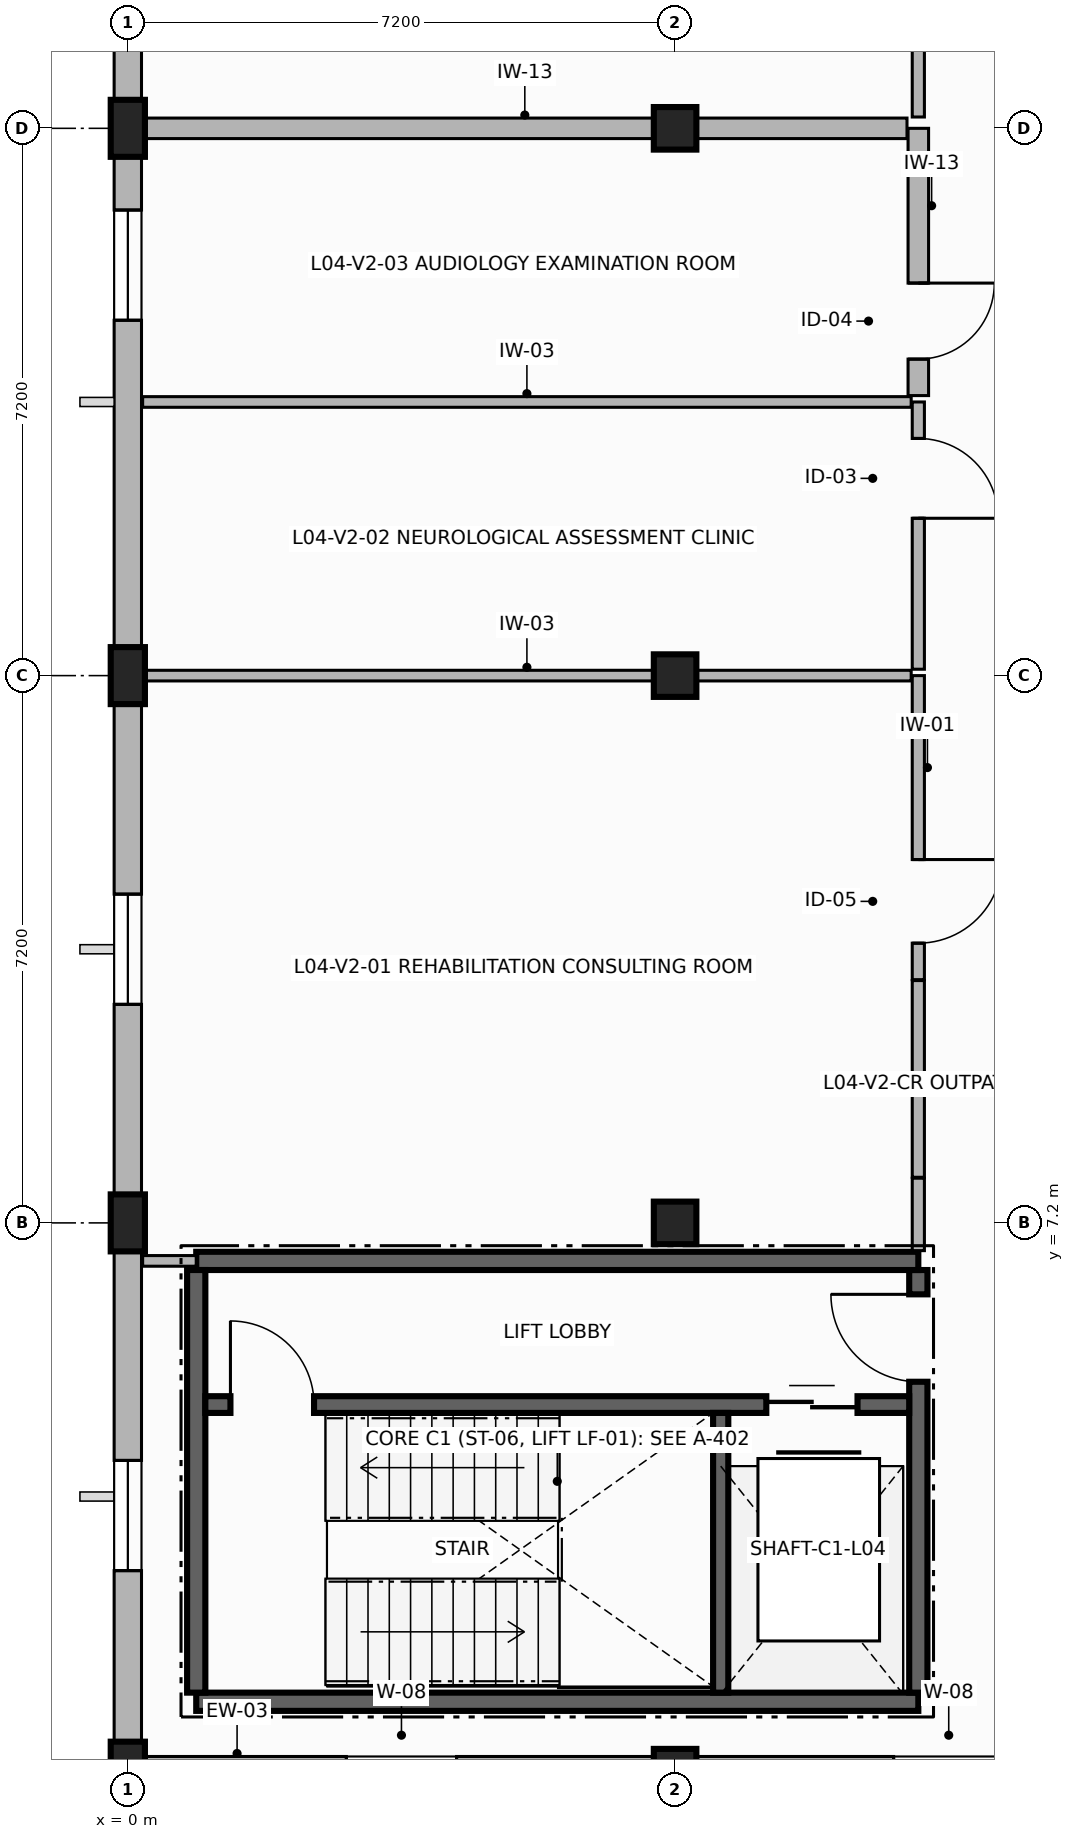
"""IFC4 building model, lengths in metres.
Left out: names, types, materials, properties, quantities, classifications, styles, units other than length and angle.
Written with IfcOpenShell. Run it as: python <this file> out.ifc"""

import sys

from ifc_helpers import new_model, si_unit, direction, frame, frame_2d, origin, origin_with_axes, origin_2d, place, context, subcontext, project, spatial, rectangle, extrude, element, fill, save


model = new_model("IFC4")
c1 = context("Model", 3, precision=1e-05, world=origin(), true_north=direction((0.0, 1.0)))
c2 = subcontext(c1, "Body", "Model", "MODEL_VIEW")
j1 = project(units=[si_unit("LENGTHUNIT", "METRE"), si_unit("PLANEANGLEUNIT", "RADIAN")], contexts=[c1])
p1 = place(None, origin())
s1 = spatial("IfcSite", under=j1, at=p1, CompositionType="ELEMENT")
p2 = place(p1, origin())
s2 = spatial("IfcBuilding", under=s1, at=p2, CompositionType="ELEMENT")
p3 = place(p2, frame((0.0, 0.0, 16.0)))
s3 = spatial("IfcBuildingStorey", under=s2, at=p3, CompositionType="ELEMENT", Elevation=16.0)
for number, where, z_axis, x_axis in (
    (1, (0.0, 0.0, 0.0), (0.0, 0.0, 1.0), (1.0, 0.0, 0.0)),
    (2, (0.0, 7.2, 0.0), (0.0, 0.0, 1.0), (1.0, 0.0, 0.0)),
    (3, (0.0, 14.4, 0.0), (0.0, 0.0, 1.0), (1.0, 0.0, 0.0)),
    (4, (0.0, 21.6, 0.0), (0.0, 0.0, 1.0), (1.0, 0.0, 0.0)),
):
    element("IfcColumn", number, at=place(p3, frame(where, z_axis=z_axis, x_axis=x_axis)), inside=s3, PredefinedType="PILASTER", context=c2, shape_type="SweptSolid", body=[
        extrude(rectangle(XDim=0.45, YDim=0.75, at=origin_2d()), origin(), (0.0, 0.0, 1.0), 3.42),
    ])
for number, where, z_axis, x_axis in (
    (5, (7.2, 0.0, 0.0), (0.0, 0.0, 1.0), (1.0, 0.0, 0.0)),
    (6, (7.2, 7.2, 0.0), (0.0, 0.0, 1.0), (1.0, 0.0, 0.0)),
    (7, (7.2, 14.4, 0.0), (0.0, 0.0, 1.0), (1.0, 0.0, 0.0)),
    (8, (7.2, 21.6, 0.0), (0.0, 0.0, 1.0), (1.0, 0.0, 0.0)),
):
    element("IfcColumn", number, at=place(p3, frame(where, z_axis=z_axis, x_axis=x_axis)), inside=s3, PredefinedType="COLUMN", context=c2, shape_type="SweptSolid", body=[
        extrude(rectangle(XDim=0.56, YDim=0.56, at=origin_2d()), origin(), (0.0, 0.0, 1.0), 3.42),
    ])
p4 = place(p3, origin_with_axes())
e9 = element("IfcWall", 9, at=p4, inside=s3, PredefinedType="SOLIDWALL", context=c2, shape_type="SweptSolid", body=[
    extrude(rectangle(XDim=7.2, YDim=0.36, at=frame_2d((3.6, 0.0))), origin(), (0.0, 0.0, 1.0), 2.8),
])
p5 = place(p4, frame((2.875, 0.0, 0.85)))
e10 = element("IfcOpeningElement", 10, at=p5, cuts=e9, PredefinedType="OPENING", context=c2, shape_type="SweptSolid", body=[
    extrude(rectangle(XDim=1.45, YDim=1.75, at=frame_2d((0.725, 0.875))), frame((0.0, 0.19, 0.0), z_axis=(0.0, -1.0, 0.0), x_axis=(1.0, 0.0, 0.0)), (0.0, 0.0, 1.0), 0.38),
])
p6 = place(p3, frame((7.2, 0.0, 0.0), z_axis=(0.0, 0.0, 1.0), x_axis=(1.0, 0.0, 0.0)))
e11 = element("IfcWall", 11, at=p6, inside=s3, PredefinedType="SOLIDWALL", context=c2, shape_type="SweptSolid", body=[
    extrude(rectangle(XDim=7.2, YDim=0.36, at=frame_2d((3.6, 0.0))), origin(), (0.0, 0.0, 1.0), 2.8),
])
p7 = place(p6, frame((2.875, 0.0, 0.85)))
e12 = element("IfcOpeningElement", 12, at=p7, cuts=e11, PredefinedType="OPENING", context=c2, shape_type="SweptSolid", body=[
    extrude(rectangle(XDim=1.45, YDim=1.75, at=frame_2d((0.725, 0.875))), frame((0.0, 0.19, 0.0), z_axis=(0.0, -1.0, 0.0), x_axis=(1.0, 0.0, 0.0)), (0.0, 0.0, 1.0), 0.38),
])
p8 = place(p3, frame((0.0, 28.8, 0.0), z_axis=(0.0, 0.0, 1.0), x_axis=(0.0, -1.0, 0.0)))
e13 = element("IfcWall", 13, at=p8, inside=s3, PredefinedType="SOLIDWALL", context=c2, shape_type="SweptSolid", body=[
    extrude(rectangle(XDim=7.2, YDim=0.36, at=frame_2d((3.6, 0.0))), origin(), (0.0, 0.0, 1.0), 2.8),
])
p9 = place(p8, frame((2.875, 0.0, 0.85)))
e14 = element("IfcOpeningElement", 14, at=p9, cuts=e13, PredefinedType="OPENING", context=c2, shape_type="SweptSolid", body=[
    extrude(rectangle(XDim=1.45, YDim=1.75, at=frame_2d((0.725, 0.875))), frame((0.0, 0.19, 0.0), z_axis=(0.0, -1.0, 0.0), x_axis=(1.0, 0.0, 0.0)), (0.0, 0.0, 1.0), 0.38),
])
p10 = place(p3, frame((0.0, 21.6, 0.0), z_axis=(0.0, 0.0, 1.0), x_axis=(0.0, -1.0, 0.0)))
e15 = element("IfcWall", 15, at=p10, inside=s3, PredefinedType="SOLIDWALL", context=c2, shape_type="SweptSolid", body=[
    extrude(rectangle(XDim=7.2, YDim=0.36, at=frame_2d((3.6, 0.0))), origin(), (0.0, 0.0, 1.0), 2.8),
])
p11 = place(p10, frame((1.075, 0.0, 0.85)))
e16 = element("IfcOpeningElement", 16, at=p11, cuts=e15, PredefinedType="OPENING", context=c2, shape_type="SweptSolid", body=[
    extrude(rectangle(XDim=1.45, YDim=1.75, at=frame_2d((0.725, 0.875))), frame((0.0, 0.19, 0.0), z_axis=(0.0, -1.0, 0.0), x_axis=(1.0, 0.0, 0.0)), (0.0, 0.0, 1.0), 0.38),
])
p12 = place(p3, frame((0.0, 14.4, 0.0), z_axis=(0.0, 0.0, 1.0), x_axis=(0.0, -1.0, 0.0)))
e17 = element("IfcWall", 17, at=p12, inside=s3, PredefinedType="SOLIDWALL", context=c2, shape_type="SweptSolid", body=[
    extrude(rectangle(XDim=7.2, YDim=0.36, at=frame_2d((3.6, 0.0))), origin(), (0.0, 0.0, 1.0), 2.8),
])
p13 = place(p12, frame((2.875, 0.0, 0.85)))
e18 = element("IfcOpeningElement", 18, at=p13, cuts=e17, PredefinedType="OPENING", context=c2, shape_type="SweptSolid", body=[
    extrude(rectangle(XDim=1.45, YDim=1.75, at=frame_2d((0.725, 0.875))), frame((0.0, 0.19, 0.0), z_axis=(0.0, -1.0, 0.0), x_axis=(1.0, 0.0, 0.0)), (0.0, 0.0, 1.0), 0.38),
])
p14 = place(p3, frame((0.0, 7.2, 0.0), z_axis=(0.0, 0.0, 1.0), x_axis=(0.0, -1.0, 0.0)))
e19 = element("IfcWall", 19, at=p14, inside=s3, PredefinedType="SOLIDWALL", context=c2, shape_type="SweptSolid", body=[
    extrude(rectangle(XDim=7.2, YDim=0.36, at=frame_2d((3.6, 0.0))), origin(), (0.0, 0.0, 1.0), 2.8),
])
p15 = place(p14, frame((3.125, 0.0, 0.85)))
e20 = element("IfcOpeningElement", 20, at=p15, cuts=e19, PredefinedType="OPENING", context=c2, shape_type="SweptSolid", body=[
    extrude(rectangle(XDim=1.45, YDim=1.75, at=frame_2d((0.725, 0.875))), frame((0.0, 0.19, 0.0), z_axis=(0.0, -1.0, 0.0), x_axis=(1.0, 0.0, 0.0)), (0.0, 0.0, 1.0), 0.38),
])
p16 = place(p3, frame((0.9, 0.9, 0.0), z_axis=(0.0, 0.0, 1.0), x_axis=(1.0, 0.0, 0.0)))
e21 = element("IfcWall", 21, at=p16, inside=s3, PredefinedType="SHEAR", context=c2, shape_type="SweptSolid", body=[
    extrude(rectangle(XDim=9.5, YDim=0.24, at=frame_2d((4.75, 0.0))), origin(), (0.0, 0.0, 1.0), 3.42),
])
p17 = place(p3, frame((10.4, 1.02, 0.0), z_axis=(0.0, 0.0, 1.0), x_axis=(0.0, 1.0, 0.0)))
e22 = element("IfcWall", 22, at=p17, inside=s3, PredefinedType="SHEAR", context=c2, shape_type="SweptSolid", body=[
    extrude(rectangle(XDim=5.56, YDim=0.24, at=frame_2d((2.78, 0.0))), origin(), (0.0, 0.0, 1.0), 3.42),
])
p18 = place(p17, frame((4.09, 0.0, 0.0)))
e23 = element("IfcOpeningElement", 23, at=p18, cuts=e22, PredefinedType="OPENING", context=c2, shape_type="SweptSolid", body=[
    extrude(rectangle(XDim=1.15, YDim=2.2, at=frame_2d((0.575, 1.1))), frame((0.0, 0.13, 0.0), z_axis=(0.0, -1.0, 0.0), x_axis=(1.0, 0.0, 0.0)), (0.0, 0.0, 1.0), 0.26),
])
p19 = place(p3, frame((10.4, 6.7, 0.0), z_axis=(0.0, 0.0, 1.0), x_axis=(-1.0, 0.0, 0.0)))
e24 = element("IfcWall", 24, at=p19, inside=s3, PredefinedType="SHEAR", context=c2, shape_type="SweptSolid", body=[
    extrude(rectangle(XDim=9.5, YDim=0.24, at=frame_2d((4.75, 0.0))), origin(), (0.0, 0.0, 1.0), 3.42),
])
p20 = place(p3, frame((0.9, 6.58, 0.0), z_axis=(0.0, 0.0, 1.0), x_axis=(0.0, -1.0, 0.0)))
e25 = element("IfcWall", 25, at=p20, inside=s3, PredefinedType="SHEAR", context=c2, shape_type="SweptSolid", body=[
    extrude(rectangle(XDim=5.56, YDim=0.24, at=frame_2d((2.78, 0.0))), origin(), (0.0, 0.0, 1.0), 3.42),
])
p21 = place(p3, frame((1.02, 4.81, 0.0), z_axis=(0.0, 0.0, 1.0), x_axis=(1.0, 0.0, 0.0)))
e26 = element("IfcWall", 26, at=p21, inside=s3, PredefinedType="SHEAR", context=c2, shape_type="SweptSolid", body=[
    extrude(rectangle(XDim=9.26, YDim=0.22, at=frame_2d((4.63, 0.0))), origin(), (0.0, 0.0, 1.0), 3.42),
])
p22 = place(p21, frame((0.33, 0.0, 0.0)))
e27 = element("IfcOpeningElement", 27, at=p22, cuts=e26, PredefinedType="OPENING", context=c2, shape_type="SweptSolid", body=[
    extrude(rectangle(XDim=1.1, YDim=2.15, at=frame_2d((0.55, 1.075))), frame((0.0, 0.12, 0.0), z_axis=(0.0, -1.0, 0.0), x_axis=(1.0, 0.0, 0.0)), (0.0, 0.0, 1.0), 0.24),
])
p23 = place(p21, frame((7.38, 0.0, 0.0)))
e28 = element("IfcOpeningElement", 28, at=p23, cuts=e26, PredefinedType="OPENING", context=c2, shape_type="SweptSolid", body=[
    extrude(rectangle(XDim=1.2, YDim=2.2, at=frame_2d((0.6, 1.1))), frame((0.0, 0.12, 0.0), z_axis=(0.0, -1.0, 0.0), x_axis=(1.0, 0.0, 0.0)), (0.0, 0.0, 1.0), 0.24),
])
p24 = place(p3, frame((7.8, 1.02, 0.0), z_axis=(0.0, 0.0, 1.0), x_axis=(0.0, 1.0, 0.0)))
e29 = element("IfcWall", 29, at=p24, inside=s3, PredefinedType="SHEAR", context=c2, shape_type="SweptSolid", body=[
    extrude(rectangle(XDim=3.68, YDim=0.2, at=frame_2d((1.84, 0.0))), origin(), (0.0, 0.0, 1.0), 3.42),
])
p25 = place(p3, frame((10.4, 14.4, 0.0), z_axis=(0.0, 0.0, 1.0), x_axis=(0.0, -1.0, 0.0)))
e30 = element("IfcWall", 30, at=p25, inside=s3, PredefinedType="PARTITIONING", context=c2, shape_type="SweptSolid", body=[
    extrude(rectangle(XDim=4.0, YDim=0.16, at=frame_2d((2.0, 0.0))), origin(), (0.0, 0.0, 1.0), 2.78),
])
p26 = place(p25, frame((2.42, 0.0, 0.0)))
e31 = element("IfcOpeningElement", 31, at=p26, cuts=e30, PredefinedType="OPENING", context=c2, shape_type="SweptSolid", body=[
    extrude(rectangle(XDim=1.1, YDim=2.2, at=frame_2d((0.55, 1.1))), frame((0.0, 0.09, 0.0), z_axis=(0.0, -1.0, 0.0), x_axis=(1.0, 0.0, 0.0)), (0.0, 0.0, 1.0), 0.18),
])
p27 = place(p3, frame((10.4, 10.388, 0.0), z_axis=(0.0, 0.0, 1.0), x_axis=(0.0, -1.0, 0.0)))
e32 = element("IfcWall", 32, at=p27, inside=s3, PredefinedType="PARTITIONING", context=c2, shape_type="SweptSolid", body=[
    extrude(rectangle(XDim=2.588, YDim=0.16, at=frame_2d((1.294, 0.0))), origin(), (0.0, 0.0, 1.0), 2.78),
])
p28 = place(p3, frame((10.4, 7.788, 0.0), z_axis=(0.0, 0.0, 1.0), x_axis=(0.0, -1.0, 0.0)))
e33 = element("IfcWall", 33, at=p28, inside=s3, PredefinedType="PARTITIONING", context=c2, shape_type="SweptSolid", body=[
    extrude(rectangle(XDim=0.953, YDim=0.16, at=frame_2d((0.477, 0.0))), origin(), (0.0, 0.0, 1.0), 2.78),
])
p29 = place(p3, frame((0.9, 6.7, 0.0), z_axis=(0.0, 0.0, 1.0), x_axis=(-1.0, 0.0, 0.0)))
e34 = element("IfcWall", 34, at=p29, inside=s3, PredefinedType="PARTITIONING", context=c2, shape_type="SweptSolid", body=[
    extrude(rectangle(XDim=0.705, YDim=0.14, at=frame_2d((0.353, 0.0))), origin(), (0.0, 0.0, 1.0), 2.78),
])
p30 = place(p3, frame((0.195, 14.4, 0.0), z_axis=(0.0, 0.0, 1.0), x_axis=(1.0, 0.0, 0.0)))
e35 = element("IfcWall", 35, at=p30, inside=s3, PredefinedType="PARTITIONING", context=c2, shape_type="SweptSolid", body=[
    extrude(rectangle(XDim=10.111, YDim=0.14, at=frame_2d((5.055, 0.0))), origin(), (0.0, 0.0, 1.0), 2.78),
])
p31 = place(p3, frame((10.4, 18.0, 0.0), z_axis=(0.0, 0.0, 1.0), x_axis=(0.0, -1.0, 0.0)))
e36 = element("IfcWall", 36, at=p31, inside=s3, PredefinedType="PARTITIONING", context=c2, shape_type="SweptSolid", body=[
    extrude(rectangle(XDim=3.516, YDim=0.16, at=frame_2d((1.758, 0.0))), origin(), (0.0, 0.0, 1.0), 2.78),
])
p32 = place(p31, frame((0.48, 0.0, 0.0)))
e37 = element("IfcOpeningElement", 37, at=p32, cuts=e36, PredefinedType="OPENING", context=c2, shape_type="SweptSolid", body=[
    extrude(rectangle(XDim=1.05, YDim=2.15, at=frame_2d((0.525, 1.075))), frame((0.0, 0.09, 0.0), z_axis=(0.0, -1.0, 0.0), x_axis=(1.0, 0.0, 0.0)), (0.0, 0.0, 1.0), 0.18),
])
p33 = place(p3, frame((0.195, 18.0, 0.0), z_axis=(0.0, 0.0, 1.0), x_axis=(1.0, 0.0, 0.0)))
e38 = element("IfcWall", 38, at=p33, inside=s3, PredefinedType="PARTITIONING", context=c2, shape_type="SweptSolid", body=[
    extrude(rectangle(XDim=10.111, YDim=0.14, at=frame_2d((5.055, 0.0))), origin(), (0.0, 0.0, 1.0), 2.78),
])
p34 = place(p3, frame((10.4, 21.6, 0.0), z_axis=(0.0, 0.0, 1.0), x_axis=(0.0, -1.0, 0.0)))
e39 = element("IfcWall", 39, at=p34, inside=s3, PredefinedType="PARTITIONING", context=c2, shape_type="SweptSolid", body=[
    extrude(rectangle(XDim=3.516, YDim=0.27, at=frame_2d((1.758, 0.0))), origin(), (0.0, 0.0, 1.0), 2.78),
])
p35 = place(p34, frame((2.036, 0.0, 0.0)))
e40 = element("IfcOpeningElement", 40, at=p35, cuts=e39, PredefinedType="OPENING", context=c2, shape_type="SweptSolid", body=[
    extrude(rectangle(XDim=1.0, YDim=2.15, at=frame_2d((0.5, 1.075))), frame((0.0, 0.145, 0.0), z_axis=(0.0, -1.0, 0.0), x_axis=(1.0, 0.0, 0.0)), (0.0, 0.0, 1.0), 0.29),
])
p36 = place(p3, frame((0.195, 21.6, 0.0), z_axis=(0.0, 0.0, 1.0), x_axis=(1.0, 0.0, 0.0)))
e41 = element("IfcWall", 41, at=p36, inside=s3, PredefinedType="PARTITIONING", context=c2, shape_type="SweptSolid", body=[
    extrude(rectangle(XDim=10.056, YDim=0.27, at=frame_2d((5.028, 0.0))), origin(), (0.0, 0.0, 1.0), 2.78),
])
p37 = place(p3, frame((10.4, 28.8, 0.0), z_axis=(0.0, 0.0, 1.0), x_axis=(0.0, -1.0, 0.0)))
e42 = element("IfcWall", 42, at=p37, inside=s3, PredefinedType="PARTITIONING", context=c2, shape_type="SweptSolid", body=[
    extrude(rectangle(XDim=7.051, YDim=0.16, at=frame_2d((3.525, 0.0))), origin(), (0.0, 0.0, 1.0), 2.78),
])
p38 = place(p37, frame((3.026, 0.0, 0.0)))
e43 = element("IfcOpeningElement", 43, at=p38, cuts=e42, PredefinedType="OPENING", context=c2, shape_type="SweptSolid", body=[
    extrude(rectangle(XDim=1.0, YDim=2.15, at=frame_2d((0.5, 1.075))), frame((0.0, 0.09, 0.0), z_axis=(0.0, -1.0, 0.0), x_axis=(1.0, 0.0, 0.0)), (0.0, 0.0, 1.0), 0.18),
])
p39 = place(p11, origin())
e44 = element("IfcWindow", 44, at=p39, inside=s3, PartitioningType="SINGLE_PANEL", PredefinedType="WINDOW", context=c2, shape_type="SweptSolid", body=[
    extrude(rectangle(XDim=1.45, YDim=1.75, at=frame_2d((0.725, 0.875))), frame((0.0, 0.03, 0.0), z_axis=(0.0, -1.0, 0.0), x_axis=(1.0, 0.0, 0.0)), (0.0, 0.0, 1.0), 0.06),
])
fill(e16, e44)
p40 = place(p13, origin())
e45 = element("IfcWindow", 45, at=p40, inside=s3, PartitioningType="SINGLE_PANEL", PredefinedType="WINDOW", context=c2, shape_type="SweptSolid", body=[
    extrude(rectangle(XDim=1.45, YDim=1.75, at=frame_2d((0.725, 0.875))), frame((0.0, 0.03, 0.0), z_axis=(0.0, -1.0, 0.0), x_axis=(1.0, 0.0, 0.0)), (0.0, 0.0, 1.0), 0.06),
])
fill(e18, e45)
p41 = place(p15, origin())
e46 = element("IfcWindow", 46, at=p41, inside=s3, PartitioningType="SINGLE_PANEL", PredefinedType="WINDOW", context=c2, shape_type="SweptSolid", body=[
    extrude(rectangle(XDim=1.45, YDim=1.75, at=frame_2d((0.725, 0.875))), frame((0.0, 0.03, 0.0), z_axis=(0.0, -1.0, 0.0), x_axis=(1.0, 0.0, 0.0)), (0.0, 0.0, 1.0), 0.06),
])
fill(e20, e46)
p42 = place(p22, origin())
e47 = element("IfcDoor", 47, at=p42, inside=s3, OperationType="SINGLE_SWING_LEFT", PredefinedType="DOOR", context=c2, shape_type="SweptSolid", body=[
    extrude(rectangle(XDim=1.1, YDim=2.15, at=frame_2d((0.55, 1.075))), frame((0.0, 0.025, 0.0), z_axis=(0.0, -1.0, 0.0), x_axis=(1.0, 0.0, 0.0)), (0.0, 0.0, 1.0), 0.05),
])
fill(e27, e47)
p43 = place(p23, origin())
e48 = element("IfcDoor", 48, at=p43, inside=s3, OperationType="DOUBLE_DOOR_SLIDING", PredefinedType="DOOR", context=c2, shape_type="SweptSolid", body=[
    extrude(rectangle(XDim=1.2, YDim=2.2, at=frame_2d((0.6, 1.1))), frame((0.0, 0.025, 0.0), z_axis=(0.0, -1.0, 0.0), x_axis=(1.0, 0.0, 0.0)), (0.0, 0.0, 1.0), 0.05),
])
fill(e28, e48)
p44 = place(p18, origin())
e49 = element("IfcDoor", 49, at=p44, inside=s3, OperationType="SINGLE_SWING_RIGHT", PredefinedType="DOOR", context=c2, shape_type="SweptSolid", body=[
    extrude(rectangle(XDim=1.15, YDim=2.2, at=frame_2d((0.575, 1.1))), frame((0.0, 0.025, 0.0), z_axis=(0.0, -1.0, 0.0), x_axis=(1.0, 0.0, 0.0)), (0.0, 0.0, 1.0), 0.05),
])
fill(e23, e49)
p45 = place(p26, origin())
e50 = element("IfcDoor", 50, at=p45, inside=s3, OperationType="SINGLE_SWING_LEFT", PredefinedType="DOOR", context=c2, shape_type="SweptSolid", body=[
    extrude(rectangle(XDim=1.1, YDim=2.2, at=frame_2d((0.55, 1.1))), frame((0.0, 0.025, 0.0), z_axis=(0.0, -1.0, 0.0), x_axis=(1.0, 0.0, 0.0)), (0.0, 0.0, 1.0), 0.05),
])
fill(e31, e50)
p46 = place(p32, origin())
e51 = element("IfcDoor", 51, at=p46, inside=s3, OperationType="SINGLE_SWING_RIGHT", PredefinedType="DOOR", context=c2, shape_type="SweptSolid", body=[
    extrude(rectangle(XDim=1.05, YDim=2.15, at=frame_2d((0.525, 1.075))), frame((0.0, 0.025, 0.0), z_axis=(0.0, -1.0, 0.0), x_axis=(1.0, 0.0, 0.0)), (0.0, 0.0, 1.0), 0.05),
])
fill(e37, e51)
p47 = place(p35, origin())
e52 = element("IfcDoor", 52, at=p47, inside=s3, OperationType="SINGLE_SWING_LEFT", PredefinedType="DOOR", context=c2, shape_type="SweptSolid", body=[
    extrude(rectangle(XDim=1.0, YDim=2.15, at=frame_2d((0.5, 1.075))), frame((0.0, 0.025, 0.0), z_axis=(0.0, -1.0, 0.0), x_axis=(1.0, 0.0, 0.0)), (0.0, 0.0, 1.0), 0.05),
])
fill(e40, e52)
save(model, sys.argv[1])
